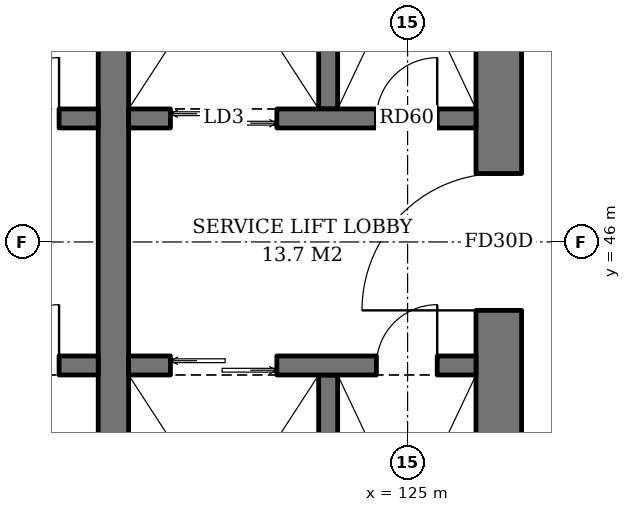
"""IFC4 building model, lengths in metres.
Left out: names, types, materials, properties, quantities, classifications, styles, units other than length and angle.
Written with IfcOpenShell. Run it as: python <this file> out.ifc"""

import sys

from ifc_helpers import new_model, si_unit, direction, frame, frame_2d, origin, place, context, subcontext, project, spatial, rectangle, extrude, element, fill, save


model = new_model("IFC4")
c1 = context("Model", 3, precision=1e-05, world=origin(), true_north=direction((0.0, 1.0)))
c2 = subcontext(c1, "Body", "Model", "MODEL_VIEW")
j1 = project(units=[si_unit("LENGTHUNIT", "METRE"), si_unit("PLANEANGLEUNIT", "RADIAN")], contexts=[c1])
p1 = place(None, origin())
s1 = spatial("IfcSite", under=j1, at=p1, CompositionType="ELEMENT")
p2 = place(p1, origin())
s2 = spatial("IfcBuilding", under=s1, at=p2, CompositionType="ELEMENT")
p3 = place(p2, frame((0.0, 0.0, 93.2)))
s3 = spatial("IfcBuildingStorey", under=s2, at=p3, CompositionType="ELEMENT", Elevation=93.2)
p4 = place(p3, frame((126.2, 37.1, 0.0), z_axis=(0.0, 0.0, 1.0), x_axis=(0.0, 1.0, 0.0)))
e1 = element("IfcWall", 1, at=p4, inside=s3, PredefinedType="SHEAR", context=c2, shape_type="SweptSolid", body=[
    extrude(rectangle(XDim=17.8, YDim=0.6, at=frame_2d((8.9, 0.0))), origin(), (0.0, 0.0, 1.0), 3.8),
])
p5 = place(p4, frame((8.0, 0.0, 0.0)))
e2 = element("IfcOpeningElement", 2, at=p5, cuts=e1, PredefinedType="OPENING", context=c2, shape_type="SweptSolid", body=[
    extrude(rectangle(XDim=1.8, YDim=2.4, at=frame_2d((0.9, 1.2))), frame((0.0, 0.31, 0.0), z_axis=(0.0, -1.0, 0.0), x_axis=(1.0, 0.0, 0.0)), (0.0, 0.0, 1.0), 0.62),
])
p6 = place(p3, frame((121.13, 40.4, 0.0), z_axis=(0.0, 0.0, 1.0), x_axis=(0.0, 1.0, 0.0)))
e3 = element("IfcWall", 3, at=p6, inside=s3, PredefinedType="SHEAR", context=c2, shape_type="SweptSolid", body=[
    extrude(rectangle(XDim=11.2, YDim=0.4, at=frame_2d((5.6, 0.0))), origin(), (0.0, 0.0, 1.0), 3.8),
])
p7 = place(p3, frame((108.1, 47.625, 0.0), z_axis=(0.0, 0.0, 1.0), x_axis=(1.0, 0.0, 0.0)))
e4 = element("IfcWall", 4, at=p7, inside=s3, PredefinedType="SHEAR", context=c2, shape_type="SweptSolid", body=[
    extrude(rectangle(XDim=12.83, YDim=0.25, at=frame_2d((6.415, 0.0))), origin(), (0.0, 0.0, 1.0), 3.8),
])
p8 = place(p7, frame((0.7, 0.0, 0.0)))
e5 = element("IfcOpeningElement", 5, at=p8, cuts=e4, PredefinedType="OPENING", context=c2, shape_type="SweptSolid", body=[
    extrude(rectangle(XDim=1.1, YDim=2.2, at=frame_2d((0.55, 1.1))), frame((0.0, 0.135, 0.0), z_axis=(0.0, -1.0, 0.0), x_axis=(1.0, 0.0, 0.0)), (0.0, 0.0, 1.0), 0.27),
])
p9 = place(p7, frame((3.45, 0.0, 0.0)))
e6 = element("IfcOpeningElement", 6, at=p9, cuts=e4, PredefinedType="OPENING", context=c2, shape_type="SweptSolid", body=[
    extrude(rectangle(XDim=1.1, YDim=2.2, at=frame_2d((0.55, 1.1))), frame((0.0, 0.135, 0.0), z_axis=(0.0, -1.0, 0.0), x_axis=(1.0, 0.0, 0.0)), (0.0, 0.0, 1.0), 0.27),
])
p10 = place(p7, frame((6.2, 0.0, 0.0)))
e7 = element("IfcOpeningElement", 7, at=p10, cuts=e4, PredefinedType="OPENING", context=c2, shape_type="SweptSolid", body=[
    extrude(rectangle(XDim=1.1, YDim=2.2, at=frame_2d((0.55, 1.1))), frame((0.0, 0.135, 0.0), z_axis=(0.0, -1.0, 0.0), x_axis=(1.0, 0.0, 0.0)), (0.0, 0.0, 1.0), 0.27),
])
p11 = place(p7, frame((8.95, 0.0, 0.0)))
e8 = element("IfcOpeningElement", 8, at=p11, cuts=e4, PredefinedType="OPENING", context=c2, shape_type="SweptSolid", body=[
    extrude(rectangle(XDim=1.1, YDim=2.2, at=frame_2d((0.55, 1.1))), frame((0.0, 0.135, 0.0), z_axis=(0.0, -1.0, 0.0), x_axis=(1.0, 0.0, 0.0)), (0.0, 0.0, 1.0), 0.27),
])
p12 = place(p7, frame((11.515, 0.0, 0.0)))
e9 = element("IfcOpeningElement", 9, at=p12, cuts=e4, PredefinedType="OPENING", context=c2, shape_type="SweptSolid", body=[
    extrude(rectangle(XDim=0.8, YDim=2.0, at=frame_2d((0.4, 1.0))), frame((0.0, 0.135, 0.0), z_axis=(0.0, -1.0, 0.0), x_axis=(1.0, 0.0, 0.0)), (0.0, 0.0, 1.0), 0.27),
])
p13 = place(p3, frame((108.1, 44.375, 0.0), z_axis=(0.0, 0.0, 1.0), x_axis=(1.0, 0.0, 0.0)))
e10 = element("IfcWall", 10, at=p13, inside=s3, PredefinedType="SHEAR", context=c2, shape_type="SweptSolid", body=[
    extrude(rectangle(XDim=12.83, YDim=0.25, at=frame_2d((6.415, 0.0))), origin(), (0.0, 0.0, 1.0), 3.8),
])
p14 = place(p13, frame((0.7, 0.0, 0.0)))
e11 = element("IfcOpeningElement", 11, at=p14, cuts=e10, PredefinedType="OPENING", context=c2, shape_type="SweptSolid", body=[
    extrude(rectangle(XDim=1.1, YDim=2.2, at=frame_2d((0.55, 1.1))), frame((0.0, 0.135, 0.0), z_axis=(0.0, -1.0, 0.0), x_axis=(1.0, 0.0, 0.0)), (0.0, 0.0, 1.0), 0.27),
])
p15 = place(p13, frame((3.45, 0.0, 0.0)))
e12 = element("IfcOpeningElement", 12, at=p15, cuts=e10, PredefinedType="OPENING", context=c2, shape_type="SweptSolid", body=[
    extrude(rectangle(XDim=1.1, YDim=2.2, at=frame_2d((0.55, 1.1))), frame((0.0, 0.135, 0.0), z_axis=(0.0, -1.0, 0.0), x_axis=(1.0, 0.0, 0.0)), (0.0, 0.0, 1.0), 0.27),
])
p16 = place(p13, frame((6.2, 0.0, 0.0)))
e13 = element("IfcOpeningElement", 13, at=p16, cuts=e10, PredefinedType="OPENING", context=c2, shape_type="SweptSolid", body=[
    extrude(rectangle(XDim=1.1, YDim=2.2, at=frame_2d((0.55, 1.1))), frame((0.0, 0.135, 0.0), z_axis=(0.0, -1.0, 0.0), x_axis=(1.0, 0.0, 0.0)), (0.0, 0.0, 1.0), 0.27),
])
p17 = place(p13, frame((9.0, 0.0, 0.0)))
e14 = element("IfcOpeningElement", 14, at=p17, cuts=e10, PredefinedType="OPENING", context=c2, shape_type="SweptSolid", body=[
    extrude(rectangle(XDim=1.0, YDim=2.1, at=frame_2d((0.5, 1.05))), frame((0.0, 0.135, 0.0), z_axis=(0.0, -1.0, 0.0), x_axis=(1.0, 0.0, 0.0)), (0.0, 0.0, 1.0), 0.27),
])
p18 = place(p13, frame((11.515, 0.0, 0.0)))
e15 = element("IfcOpeningElement", 15, at=p18, cuts=e10, PredefinedType="OPENING", context=c2, shape_type="SweptSolid", body=[
    extrude(rectangle(XDim=0.8, YDim=2.0, at=frame_2d((0.4, 1.0))), frame((0.0, 0.135, 0.0), z_axis=(0.0, -1.0, 0.0), x_axis=(1.0, 0.0, 0.0)), (0.0, 0.0, 1.0), 0.27),
])
p19 = place(p3, frame((123.955, 47.75, 0.0), z_axis=(0.0, 0.0, 1.0), x_axis=(0.0, 1.0, 0.0)))
e16 = element("IfcWall", 16, at=p19, inside=s3, PredefinedType="SHEAR", context=c2, shape_type="SweptSolid", body=[
    extrude(rectangle(XDim=3.85, YDim=0.25, at=frame_2d((1.925, 0.0))), origin(), (0.0, 0.0, 1.0), 3.8),
])
p20 = place(p3, frame((121.33, 47.625, 0.0), z_axis=(0.0, 0.0, 1.0), x_axis=(1.0, 0.0, 0.0)))
e17 = element("IfcWall", 17, at=p20, inside=s3, PredefinedType="SHEAR", context=c2, shape_type="SweptSolid", body=[
    extrude(rectangle(XDim=4.57, YDim=0.25, at=frame_2d((2.285, 0.0))), origin(), (0.0, 0.0, 1.0), 3.8),
])
p21 = place(p20, frame((0.55, 0.0, 0.0)))
e18 = element("IfcOpeningElement", 18, at=p21, cuts=e17, PredefinedType="OPENING", context=c2, shape_type="SweptSolid", body=[
    extrude(rectangle(XDim=1.4, YDim=2.4, at=frame_2d((0.7, 1.2))), frame((0.0, 0.135, 0.0), z_axis=(0.0, -1.0, 0.0), x_axis=(1.0, 0.0, 0.0)), (0.0, 0.0, 1.0), 0.27),
])
p22 = place(p20, frame((3.26, 0.0, 0.0)))
e19 = element("IfcOpeningElement", 19, at=p22, cuts=e17, PredefinedType="OPENING", context=c2, shape_type="SweptSolid", body=[
    extrude(rectangle(XDim=0.8, YDim=2.0, at=frame_2d((0.4, 1.0))), frame((0.0, 0.135, 0.0), z_axis=(0.0, -1.0, 0.0), x_axis=(1.0, 0.0, 0.0)), (0.0, 0.0, 1.0), 0.27),
])
p23 = place(p3, frame((123.955, 44.25, 0.0), z_axis=(0.0, 0.0, 1.0), x_axis=(0.0, -1.0, 0.0)))
e20 = element("IfcWall", 20, at=p23, inside=s3, PredefinedType="SHEAR", context=c2, shape_type="SweptSolid", body=[
    extrude(rectangle(XDim=3.85, YDim=0.25, at=frame_2d((1.925, 0.0))), origin(), (0.0, 0.0, 1.0), 3.8),
])
p24 = place(p3, frame((121.33, 44.375, 0.0), z_axis=(0.0, 0.0, 1.0), x_axis=(1.0, 0.0, 0.0)))
e21 = element("IfcWall", 21, at=p24, inside=s3, PredefinedType="SHEAR", context=c2, shape_type="SweptSolid", body=[
    extrude(rectangle(XDim=4.57, YDim=0.25, at=frame_2d((2.285, 0.0))), origin(), (0.0, 0.0, 1.0), 3.8),
])
p25 = place(p24, frame((0.55, 0.0, 0.0)))
e22 = element("IfcOpeningElement", 22, at=p25, cuts=e21, PredefinedType="OPENING", context=c2, shape_type="SweptSolid", body=[
    extrude(rectangle(XDim=1.4, YDim=2.4, at=frame_2d((0.7, 1.2))), frame((0.0, 0.135, 0.0), z_axis=(0.0, -1.0, 0.0), x_axis=(1.0, 0.0, 0.0)), (0.0, 0.0, 1.0), 0.27),
])
p26 = place(p24, frame((3.26, 0.0, 0.0)))
e23 = element("IfcOpeningElement", 23, at=p26, cuts=e21, PredefinedType="OPENING", context=c2, shape_type="SweptSolid", body=[
    extrude(rectangle(XDim=0.8, YDim=2.0, at=frame_2d((0.4, 1.0))), frame((0.0, 0.135, 0.0), z_axis=(0.0, -1.0, 0.0), x_axis=(1.0, 0.0, 0.0)), (0.0, 0.0, 1.0), 0.27),
])
p27 = place(p12, origin())
e24 = element("IfcDoor", 24, at=p27, inside=s3, OperationType="SINGLE_SWING_RIGHT", PredefinedType="DOOR", context=c2, shape_type="SweptSolid", body=[
    extrude(rectangle(XDim=0.8, YDim=2.0, at=frame_2d((0.4, 1.0))), frame((0.0, 0.025, 0.0), z_axis=(0.0, -1.0, 0.0), x_axis=(1.0, 0.0, 0.0)), (0.0, 0.0, 1.0), 0.05),
])
fill(e9, e24)
p28 = place(p18, origin())
e25 = element("IfcDoor", 25, at=p28, inside=s3, OperationType="SINGLE_SWING_RIGHT", PredefinedType="DOOR", context=c2, shape_type="SweptSolid", body=[
    extrude(rectangle(XDim=0.8, YDim=2.0, at=frame_2d((0.4, 1.0))), frame((0.0, 0.025, 0.0), z_axis=(0.0, -1.0, 0.0), x_axis=(1.0, 0.0, 0.0)), (0.0, 0.0, 1.0), 0.05),
])
fill(e15, e25)
p29 = place(p21, origin())
e26 = element("IfcDoor", 26, at=p29, inside=s3, OperationType="DOUBLE_DOOR_SLIDING", PredefinedType="DOOR", context=c2, shape_type="SweptSolid", body=[
    extrude(rectangle(XDim=1.4, YDim=2.4, at=frame_2d((0.7, 1.2))), frame((0.0, 0.025, 0.0), z_axis=(0.0, -1.0, 0.0), x_axis=(1.0, 0.0, 0.0)), (0.0, 0.0, 1.0), 0.05),
])
fill(e18, e26)
p30 = place(p22, origin())
e27 = element("IfcDoor", 27, at=p30, inside=s3, OperationType="SINGLE_SWING_RIGHT", PredefinedType="DOOR", context=c2, shape_type="SweptSolid", body=[
    extrude(rectangle(XDim=0.8, YDim=2.0, at=frame_2d((0.4, 1.0))), frame((0.0, 0.025, 0.0), z_axis=(0.0, -1.0, 0.0), x_axis=(1.0, 0.0, 0.0)), (0.0, 0.0, 1.0), 0.05),
])
fill(e19, e27)
p31 = place(p25, origin())
e28 = element("IfcDoor", 28, at=p31, inside=s3, OperationType="DOUBLE_DOOR_SLIDING", PredefinedType="DOOR", context=c2, shape_type="SweptSolid", body=[
    extrude(rectangle(XDim=1.4, YDim=2.4, at=frame_2d((0.7, 1.2))), frame((0.0, 0.025, 0.0), z_axis=(0.0, -1.0, 0.0), x_axis=(1.0, 0.0, 0.0)), (0.0, 0.0, 1.0), 0.05),
])
fill(e22, e28)
p32 = place(p26, origin())
e29 = element("IfcDoor", 29, at=p32, inside=s3, OperationType="SINGLE_SWING_RIGHT", PredefinedType="DOOR", context=c2, shape_type="SweptSolid", body=[
    extrude(rectangle(XDim=0.8, YDim=2.0, at=frame_2d((0.4, 1.0))), frame((0.0, 0.025, 0.0), z_axis=(0.0, -1.0, 0.0), x_axis=(1.0, 0.0, 0.0)), (0.0, 0.0, 1.0), 0.05),
])
fill(e23, e29)
p33 = place(p5, origin())
e30 = element("IfcDoor", 30, at=p33, inside=s3, OperationType="DOUBLE_DOOR_SINGLE_SWING", PredefinedType="DOOR", context=c2, shape_type="SweptSolid", body=[
    extrude(rectangle(XDim=1.8, YDim=2.4, at=frame_2d((0.9, 1.2))), frame((0.0, 0.025, 0.0), z_axis=(0.0, -1.0, 0.0), x_axis=(1.0, 0.0, 0.0)), (0.0, 0.0, 1.0), 0.05),
])
fill(e2, e30)
save(model, sys.argv[1])
